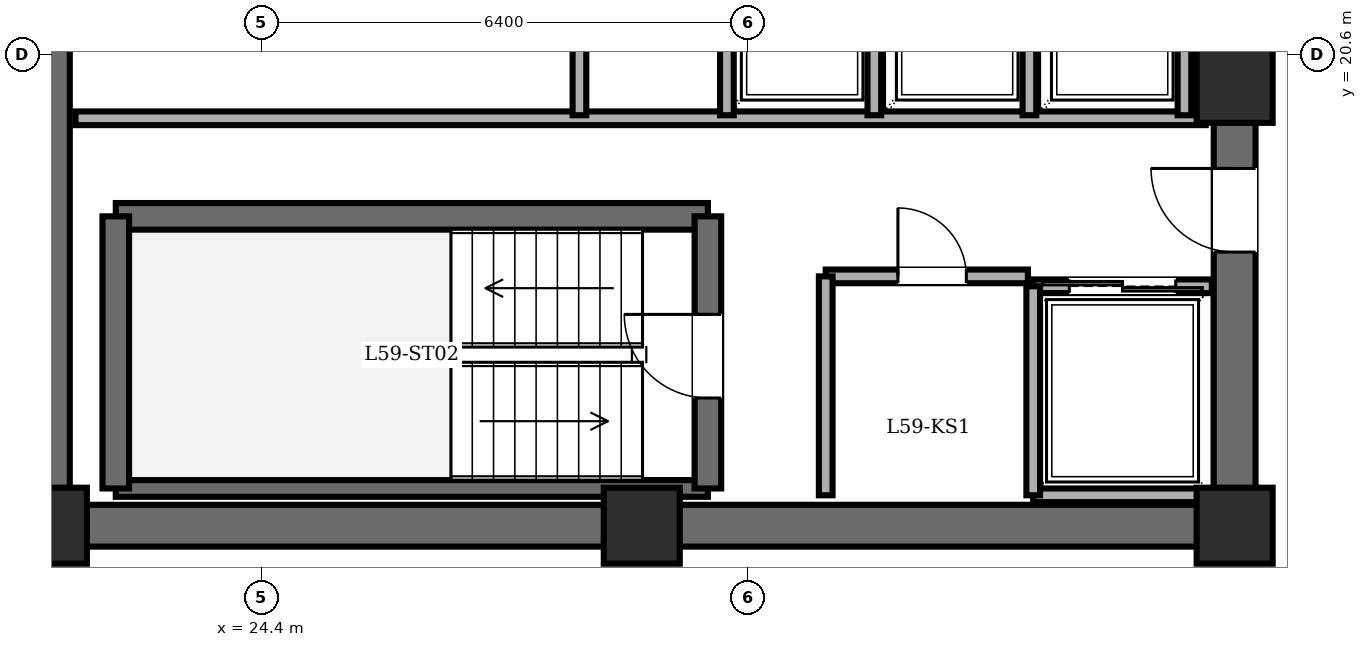
"""IFC4 building model, lengths in metres.
Left out: names, types, materials, properties, quantities, classifications, styles, units other than length and angle.
Written with IfcOpenShell. Run it as: python <this file> out.ifc"""

import sys

from ifc_helpers import new_model, si_unit, direction, frame, frame_2d, origin, origin_2d, place, context, subcontext, project, spatial, rectangle, extrude, element, fill, save


model = new_model("IFC4")
c1 = context("Model", 3, precision=1e-05, world=origin(), true_north=direction((0.0, 1.0)))
c2 = subcontext(c1, "Body", "Model", "MODEL_VIEW")
j1 = project(units=[si_unit("LENGTHUNIT", "METRE"), si_unit("PLANEANGLEUNIT", "RADIAN")], contexts=[c1])
p1 = place(None, origin())
s1 = spatial("IfcSite", under=j1, at=p1, CompositionType="ELEMENT")
p2 = place(p1, origin())
s2 = spatial("IfcBuilding", under=s1, at=p2, CompositionType="ELEMENT")
p3 = place(p2, frame((0.0, 0.0, 226.5)))
s3 = spatial("IfcBuildingStorey", under=s2, at=p3, CompositionType="ELEMENT", Elevation=226.5)
for number, where, z_axis, x_axis in (
    (1, (21.6, 14.4, 0.0), (0.0, 0.0, 1.0), (1.0, 0.0, 0.0)),
    (2, (29.4, 14.4, 0.0), (0.0, 0.0, 1.0), (1.0, 0.0, 0.0)),
    (3, (37.2, 14.4, 0.0), (0.0, 0.0, 1.0), (1.0, 0.0, 0.0)),
    (4, (37.2, 20.2, 0.0), (0.0, 0.0, 1.0), (1.0, 0.0, 0.0)),
):
    element("IfcColumn", number, at=place(p3, frame(where, z_axis=z_axis, x_axis=x_axis)), inside=s3, PredefinedType="COLUMN", context=c2, shape_type="SweptSolid", body=[
        extrude(rectangle(XDim=1.0, YDim=1.0, at=origin_2d()), origin(), (0.0, 0.0, 1.0), 3.6),
    ])
p4 = place(p3, frame((21.6, 14.4, 0.0), z_axis=(0.0, 0.0, 1.0), x_axis=(0.0, 1.0, 0.0)))
e5 = element("IfcWall", 5, at=p4, inside=s3, PredefinedType="SHEAR", context=c2, shape_type="SweptSolid", body=[
    extrude(rectangle(XDim=19.2, YDim=0.55, at=frame_2d((9.6, 0.0))), origin(), (0.0, 0.0, 1.0), 3.4),
])
p5 = place(p3, frame((37.2, 14.4, 0.0), z_axis=(0.0, 0.0, 1.0), x_axis=(-1.0, 0.0, 0.0)))
e6 = element("IfcWall", 6, at=p5, inside=s3, PredefinedType="SHEAR", context=c2, shape_type="SweptSolid", body=[
    extrude(rectangle(XDim=15.6, YDim=0.55, at=frame_2d((7.8, 0.0))), origin(), (0.0, 0.0, 1.0), 3.4),
])
p6 = place(p3, frame((37.2, 14.4, 0.0), z_axis=(0.0, 0.0, 1.0), x_axis=(0.0, 1.0, 0.0)))
e7 = element("IfcWall", 7, at=p6, inside=s3, PredefinedType="SHEAR", context=c2, shape_type="SweptSolid", body=[
    extrude(rectangle(XDim=19.2, YDim=0.55, at=frame_2d((9.6, 0.0))), origin(), (0.0, 0.0, 1.0), 3.4),
])
p7 = place(p6, frame((15.8, 0.0, 0.0)))
e8 = element("IfcOpeningElement", 8, at=p7, cuts=e7, PredefinedType="OPENING", context=c2, shape_type="SweptSolid", body=[
    extrude(rectangle(XDim=1.15, YDim=2.15, at=frame_2d((0.575, 1.075))), frame((0.0, 0.285, 0.0), z_axis=(0.0, -1.0, 0.0), x_axis=(1.0, 0.0, 0.0)), (0.0, 0.0, 1.0), 0.57),
])
p8 = place(p6, frame((3.6, 0.0, 0.0)))
e9 = element("IfcOpeningElement", 9, at=p8, cuts=e7, PredefinedType="OPENING", context=c2, shape_type="SweptSolid", body=[
    extrude(rectangle(XDim=1.1, YDim=2.15, at=frame_2d((0.55, 1.075))), frame((0.0, 0.285, 0.0), z_axis=(0.0, -1.0, 0.0), x_axis=(1.0, 0.0, 0.0)), (0.0, 0.0, 1.0), 0.57),
])
p9 = place(p6, frame((8.6, 0.0, 0.0)))
e10 = element("IfcOpeningElement", 10, at=p9, cuts=e7, PredefinedType="OPENING", context=c2, shape_type="SweptSolid", body=[
    extrude(rectangle(XDim=1.3, YDim=2.2, at=frame_2d((0.65, 1.1))), frame((0.0, 0.285, 0.0), z_axis=(0.0, -1.0, 0.0), x_axis=(1.0, 0.0, 0.0)), (0.0, 0.0, 1.0), 0.57),
])
p10 = place(p3, frame((22.48, 18.47, 0.0), z_axis=(0.0, 0.0, 1.0), x_axis=(1.0, 0.0, 0.0)))
e11 = element("IfcWall", 11, at=p10, inside=s3, PredefinedType="SOLIDWALL", context=c2, shape_type="SweptSolid", body=[
    extrude(rectangle(XDim=7.79, YDim=0.35, at=frame_2d((3.895, 0.0))), origin(), (0.0, 0.0, 1.0), 3.4),
])
p11 = place(p3, frame((22.48, 14.89, 0.0), z_axis=(0.0, 0.0, 1.0), x_axis=(1.0, 0.0, 0.0)))
e12 = element("IfcWall", 12, at=p11, inside=s3, PredefinedType="PARTITIONING", context=c2, shape_type="SweptSolid", body=[
    extrude(rectangle(XDim=7.79, YDim=0.22, at=frame_2d((3.895, 0.0))), origin(), (0.0, 0.0, 1.0), 3.4),
])
p12 = place(p3, frame((22.48, 14.89, 0.0), z_axis=(0.0, 0.0, 1.0), x_axis=(0.0, 1.0, 0.0)))
e13 = element("IfcWall", 13, at=p12, inside=s3, PredefinedType="SOLIDWALL", context=c2, shape_type="SweptSolid", body=[
    extrude(rectangle(XDim=3.58, YDim=0.35, at=frame_2d((1.79, 0.0))), origin(), (0.0, 0.0, 1.0), 3.4),
])
p13 = place(p3, frame((30.27, 14.89, 0.0), z_axis=(0.0, 0.0, 1.0), x_axis=(0.0, 1.0, 0.0)))
e14 = element("IfcWall", 14, at=p13, inside=s3, PredefinedType="SOLIDWALL", context=c2, shape_type="SweptSolid", body=[
    extrude(rectangle(XDim=3.58, YDim=0.35, at=frame_2d((1.79, 0.0))), origin(), (0.0, 0.0, 1.0), 3.4),
])
p14 = place(p13, frame((1.19, 0.0, 0.0)))
e15 = element("IfcOpeningElement", 15, at=p14, cuts=e14, PredefinedType="OPENING", context=c2, shape_type="SweptSolid", body=[
    extrude(rectangle(XDim=1.1, YDim=2.15, at=frame_2d((0.55, 1.075))), frame((0.0, 0.185, 0.0), z_axis=(0.0, -1.0, 0.0), x_axis=(1.0, 0.0, 0.0)), (0.0, 0.0, 1.0), 0.37),
])
p15 = place(p3, frame((21.95, 19.76, 0.0), z_axis=(0.0, 0.0, 1.0), x_axis=(1.0, 0.0, 0.0)))
e16 = element("IfcWall", 16, at=p15, inside=s3, PredefinedType="PARTITIONING", context=c2, shape_type="SweptSolid", body=[
    extrude(rectangle(XDim=14.87, YDim=0.18, at=frame_2d((7.435, 0.0))), origin(), (0.0, 0.0, 1.0), 3.4),
])
p16 = place(p3, frame((31.82, 17.68, 0.0), z_axis=(0.0, 0.0, 1.0), x_axis=(1.0, 0.0, 0.0)))
e17 = element("IfcWall", 17, at=p16, inside=s3, PredefinedType="PARTITIONING", context=c2, shape_type="SweptSolid", body=[
    extrude(rectangle(XDim=2.66, YDim=0.18, at=frame_2d((1.33, 0.0))), origin(), (0.0, 0.0, 1.0), 3.4),
])
p17 = place(p16, frame((0.95, 0.0, 0.0)))
e18 = element("IfcOpeningElement", 18, at=p17, cuts=e17, PredefinedType="OPENING", context=c2, shape_type="SweptSolid", body=[
    extrude(rectangle(XDim=0.9, YDim=2.05, at=frame_2d((0.45, 1.025))), frame((0.0, 0.1, 0.0), z_axis=(0.0, -1.0, 0.0), x_axis=(1.0, 0.0, 0.0)), (0.0, 0.0, 1.0), 0.2),
])
p18 = place(p3, frame((31.82, 14.8, 0.0), z_axis=(0.0, 0.0, 1.0), x_axis=(0.0, 1.0, 0.0)))
e19 = element("IfcWall", 19, at=p18, inside=s3, PredefinedType="PARTITIONING", context=c2, shape_type="SweptSolid", body=[
    extrude(rectangle(XDim=2.88, YDim=0.18, at=frame_2d((1.44, 0.0))), origin(), (0.0, 0.0, 1.0), 3.4),
])
p19 = place(p3, frame((34.55, 17.55, 0.0), z_axis=(0.0, 0.0, 1.0), x_axis=(1.0, 0.0, 0.0)))
e20 = element("IfcWall", 20, at=p19, inside=s3, PredefinedType="PARTITIONING", context=c2, shape_type="SweptSolid", body=[
    extrude(rectangle(XDim=2.35, YDim=0.18, at=frame_2d((1.175, 0.0))), origin(), (0.0, 0.0, 1.0), 3.4),
])
p20 = place(p19, frame((0.475, 0.0, 0.0)))
e21 = element("IfcOpeningElement", 21, at=p20, cuts=e20, PredefinedType="OPENING", context=c2, shape_type="SweptSolid", body=[
    extrude(rectangle(XDim=1.4, YDim=2.3, at=frame_2d((0.7, 1.15))), frame((0.0, 0.1, 0.0), z_axis=(0.0, -1.0, 0.0), x_axis=(1.0, 0.0, 0.0)), (0.0, 0.0, 1.0), 0.2),
])
p21 = place(p3, frame((36.9, 14.8, 0.0), z_axis=(0.0, 0.0, 1.0), x_axis=(-1.0, 0.0, 0.0)))
e22 = element("IfcWall", 22, at=p21, inside=s3, PredefinedType="PARTITIONING", context=c2, shape_type="SweptSolid", body=[
    extrude(rectangle(XDim=2.35, YDim=0.18, at=frame_2d((1.175, 0.0))), origin(), (0.0, 0.0, 1.0), 3.4),
])
p22 = place(p3, frame((34.55, 17.55, 0.0), z_axis=(0.0, 0.0, 1.0), x_axis=(0.0, -1.0, 0.0)))
e23 = element("IfcWall", 23, at=p22, inside=s3, PredefinedType="PARTITIONING", context=c2, shape_type="SweptSolid", body=[
    extrude(rectangle(XDim=2.75, YDim=0.18, at=frame_2d((1.375, 0.0))), origin(), (0.0, 0.0, 1.0), 3.4),
])
for number, where, z_axis, x_axis in (
    (24, (32.46, 19.8, 0.0), (0.0, 0.0, 1.0), (0.0, 1.0, 0.0)),
    (25, (34.5, 19.8, 0.0), (0.0, 0.0, 1.0), (0.0, 1.0, 0.0)),
    (26, (36.54, 19.8, 0.0), (0.0, 0.0, 1.0), (0.0, 1.0, 0.0)),
):
    element("IfcWall", number, at=place(p3, frame(where, z_axis=z_axis, x_axis=x_axis)), inside=s3, PredefinedType="PARTITIONING", context=c2, shape_type="SweptSolid", body=[
        extrude(rectangle(XDim=2.5, YDim=0.18, at=frame_2d((1.25, 0.0))), origin(), (0.0, 0.0, 1.0), 3.4),
    ])
p23 = place(p3, frame((30.52, 19.8, 0.0), z_axis=(0.0, 0.0, 1.0), x_axis=(0.0, 1.0, 0.0)))
e27 = element("IfcWall", 27, at=p23, inside=s3, PredefinedType="PARTITIONING", context=c2, shape_type="SweptSolid", body=[
    extrude(rectangle(XDim=2.55, YDim=0.18, at=frame_2d((1.275, 0.0))), origin(), (0.0, 0.0, 1.0), 3.4),
])
p24 = place(p3, frame((28.58, 19.8, 0.0), z_axis=(0.0, 0.0, 1.0), x_axis=(0.0, 1.0, 0.0)))
e28 = element("IfcWall", 28, at=p24, inside=s3, PredefinedType="PARTITIONING", context=c2, shape_type="SweptSolid", body=[
    extrude(rectangle(XDim=3.85, YDim=0.18, at=frame_2d((1.925, 0.0))), origin(), (0.0, 0.0, 1.0), 3.4),
])
p25 = place(p24, frame((1.465, 0.0, 0.0)))
e29 = element("IfcOpeningElement", 29, at=p25, cuts=e28, PredefinedType="OPENING", context=c2, shape_type="SweptSolid", body=[
    extrude(rectangle(XDim=0.92, YDim=2.1, at=frame_2d((0.46, 1.05))), frame((0.0, 0.1, 0.0), z_axis=(0.0, -1.0, 0.0), x_axis=(1.0, 0.0, 0.0)), (0.0, 0.0, 1.0), 0.2),
])
p26 = place(p14, origin())
e30 = element("IfcDoor", 30, at=p26, inside=s3, OperationType="SINGLE_SWING_RIGHT", PredefinedType="DOOR", context=c2, shape_type="SweptSolid", body=[
    extrude(rectangle(XDim=1.1, YDim=2.15, at=frame_2d((0.55, 1.075))), frame((0.0, 0.025, 0.0), z_axis=(0.0, -1.0, 0.0), x_axis=(1.0, 0.0, 0.0)), (0.0, 0.0, 1.0), 0.05),
])
fill(e15, e30)
p27 = place(p8, origin())
e31 = element("IfcDoor", 31, at=p27, inside=s3, OperationType="SINGLE_SWING_RIGHT", PredefinedType="DOOR", context=c2, shape_type="SweptSolid", body=[
    extrude(rectangle(XDim=1.1, YDim=2.15, at=frame_2d((0.55, 1.075))), frame((0.0, 0.025, 0.0), z_axis=(0.0, -1.0, 0.0), x_axis=(1.0, 0.0, 0.0)), (0.0, 0.0, 1.0), 0.05),
])
fill(e9, e31)
p28 = place(p17, origin())
e32 = element("IfcDoor", 32, at=p28, inside=s3, OperationType="SINGLE_SWING_LEFT", PredefinedType="DOOR", context=c2, shape_type="SweptSolid", body=[
    extrude(rectangle(XDim=0.9, YDim=2.05, at=frame_2d((0.45, 1.025))), frame((0.0, 0.025, 0.0), z_axis=(0.0, -1.0, 0.0), x_axis=(1.0, 0.0, 0.0)), (0.0, 0.0, 1.0), 0.05),
])
fill(e18, e32)
p29 = place(p20, origin())
e33 = element("IfcDoor", 33, at=p29, inside=s3, OperationType="DOUBLE_DOOR_SLIDING", PredefinedType="DOOR", context=c2, shape_type="SweptSolid", body=[
    extrude(rectangle(XDim=1.4, YDim=2.3, at=frame_2d((0.7, 1.15))), frame((0.0, 0.025, 0.0), z_axis=(0.0, -1.0, 0.0), x_axis=(1.0, 0.0, 0.0)), (0.0, 0.0, 1.0), 0.05),
])
fill(e21, e33)
save(model, sys.argv[1])
